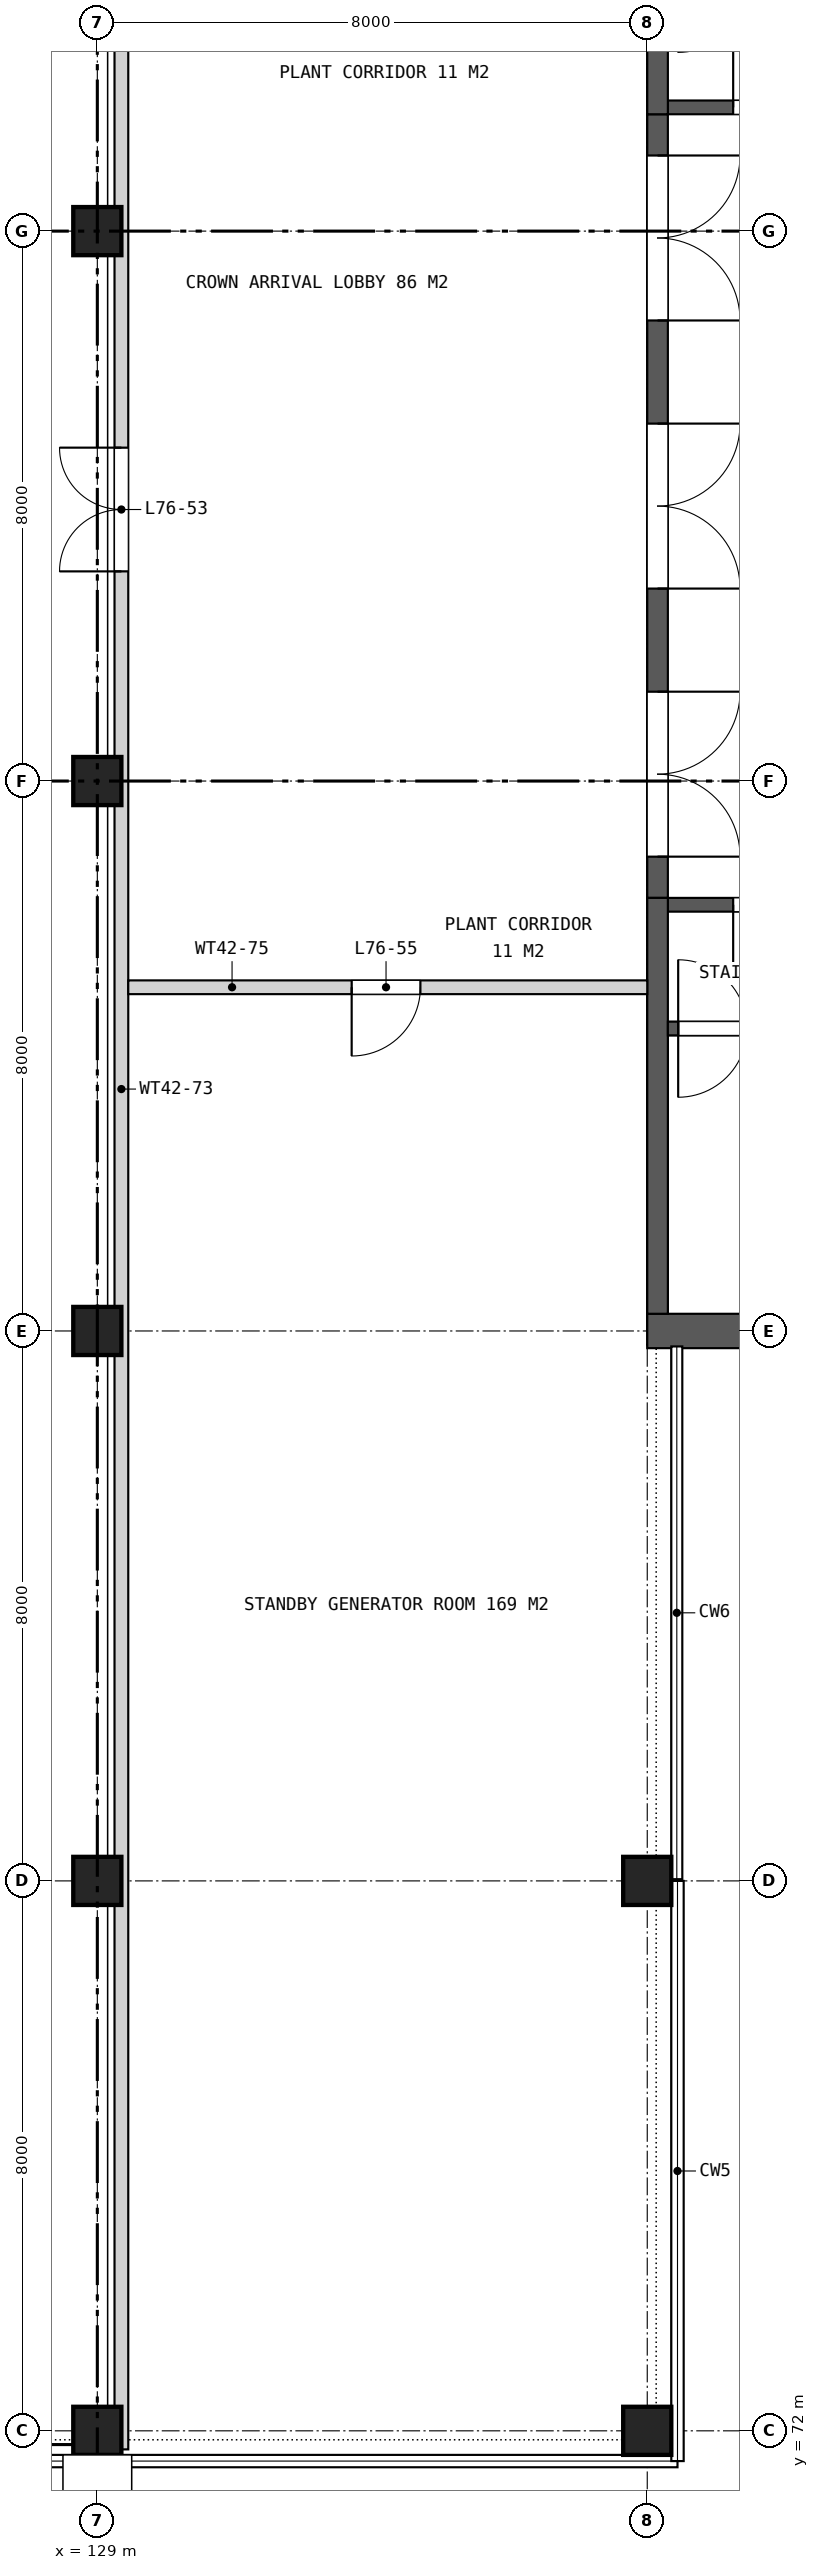
"""IFC4 building model, lengths in metres.
Left out: names, types, materials, properties, quantities, classifications, styles, units other than length and angle.
Written with IfcOpenShell. Run it as: python <this file> out.ifc"""

import sys

from ifc_helpers import new_model, si_unit, direction, frame, frame_2d, origin, origin_2d, place, context, subcontext, project, spatial, rectangle, extrude, element, fill, save


model = new_model("IFC4")
c1 = context("Model", 3, precision=1e-05, world=origin(), true_north=direction((0.0, 1.0)))
c2 = subcontext(c1, "Body", "Model", "MODEL_VIEW")
j1 = project(units=[si_unit("LENGTHUNIT", "METRE"), si_unit("PLANEANGLEUNIT", "RADIAN")], contexts=[c1])
p1 = place(None, origin())
s1 = spatial("IfcSite", under=j1, at=p1, CompositionType="ELEMENT")
p2 = place(p1, origin())
s2 = spatial("IfcBuilding", under=s1, at=p2, CompositionType="ELEMENT")
p3 = place(p2, frame((0.0, 0.0, 349.1)))
s3 = spatial("IfcBuildingStorey", under=s2, at=p3, CompositionType="ELEMENT", Elevation=349.1)
for number, where, z_axis, x_axis in (
    (1, (129.0, 72.0, 0.0), (0.0, 0.0, 1.0), (1.0, 0.0, 0.0)),
    (2, (129.0, 80.0, 0.0), (0.0, 0.0, 1.0), (1.0, 0.0, 0.0)),
    (3, (129.0, 88.0, 0.0), (0.0, 0.0, 1.0), (1.0, 0.0, 0.0)),
    (4, (129.0, 96.0, 0.0), (0.0, 0.0, 1.0), (1.0, 0.0, 0.0)),
    (5, (129.0, 104.0, 0.0), (0.0, 0.0, 1.0), (1.0, 0.0, 0.0)),
    (6, (137.0, 72.0, 0.0), (0.0, 0.0, 1.0), (1.0, 0.0, 0.0)),
    (7, (137.0, 80.0, 0.0), (0.0, 0.0, 1.0), (1.0, 0.0, 0.0)),
):
    element("IfcColumn", number, at=place(p3, frame(where, z_axis=z_axis, x_axis=x_axis)), inside=s3, PredefinedType="COLUMN", context=c2, shape_type="SweptSolid", body=[
        extrude(rectangle(XDim=0.7, YDim=0.7, at=origin_2d()), origin(), (0.0, 0.0, 1.0), 10.23),
    ])
p4 = place(p3, frame((137.0, 88.0, 0.0), z_axis=(0.0, 0.0, 1.0), x_axis=(1.0, 0.0, 0.0)))
e8 = element("IfcWall", 8, at=p4, inside=s3, PredefinedType="SHEAR", context=c2, shape_type="SweptSolid", body=[
    extrude(rectangle(XDim=7.1, YDim=0.5, at=frame_2d((3.55, 0.0))), origin(), (0.0, 0.0, 1.0), 12.0),
])
p5 = place(p3, frame((137.15, 94.3, 0.0), z_axis=(0.0, 0.0, 1.0), x_axis=(0.0, 1.0, 0.0)))
e9 = element("IfcWall", 9, at=p5, inside=s3, PredefinedType="SHEAR", context=c2, shape_type="SweptSolid", body=[
    extrude(rectangle(XDim=11.4, YDim=0.3, at=frame_2d((5.7, 0.0))), origin(), (0.0, 0.0, 1.0), 12.0),
])
p6 = place(p5, frame((0.6, 0.0, 0.0)))
e10 = element("IfcOpeningElement", 10, at=p6, cuts=e9, PredefinedType="OPENING", context=c2, shape_type="SweptSolid", body=[
    extrude(rectangle(XDim=2.4, YDim=2.4, at=frame_2d((1.2, 1.2))), frame((0.0, 0.16, 0.0), z_axis=(0.0, -1.0, 0.0), x_axis=(1.0, 0.0, 0.0)), (0.0, 0.0, 1.0), 0.32),
])
p7 = place(p5, frame((4.5, 0.0, 0.0)))
e11 = element("IfcOpeningElement", 11, at=p7, cuts=e9, PredefinedType="OPENING", context=c2, shape_type="SweptSolid", body=[
    extrude(rectangle(XDim=2.4, YDim=2.4, at=frame_2d((1.2, 1.2))), frame((0.0, 0.16, 0.0), z_axis=(0.0, -1.0, 0.0), x_axis=(1.0, 0.0, 0.0)), (0.0, 0.0, 1.0), 0.32),
])
p8 = place(p5, frame((8.4, 0.0, 0.0)))
e12 = element("IfcOpeningElement", 12, at=p8, cuts=e9, PredefinedType="OPENING", context=c2, shape_type="SweptSolid", body=[
    extrude(rectangle(XDim=2.4, YDim=2.4, at=frame_2d((1.2, 1.2))), frame((0.0, 0.16, 0.0), z_axis=(0.0, -1.0, 0.0), x_axis=(1.0, 0.0, 0.0)), (0.0, 0.0, 1.0), 0.32),
])
p9 = place(p3, frame((137.3, 105.8, 0.0), z_axis=(0.0, 0.0, 1.0), x_axis=(1.0, 0.0, 0.0)))
e13 = element("IfcWall", 13, at=p9, inside=s3, PredefinedType="SHEAR", context=c2, shape_type="SweptSolid", body=[
    extrude(rectangle(XDim=15.5, YDim=0.2, at=frame_2d((7.75, 0.0))), origin(), (0.0, 0.0, 1.0), 9.2),
])
p10 = place(p9, frame((0.95, 0.0, 0.0)))
e14 = element("IfcOpeningElement", 14, at=p10, cuts=e13, PredefinedType="OPENING", context=c2, shape_type="SweptSolid", body=[
    extrude(rectangle(XDim=1.1, YDim=2.1, at=frame_2d((0.55, 1.05))), frame((0.0, 0.11, 0.0), z_axis=(0.0, -1.0, 0.0), x_axis=(1.0, 0.0, 0.0)), (0.0, 0.0, 1.0), 0.22),
])
p11 = place(p3, frame((137.15, 105.7, 0.0), z_axis=(0.0, 0.0, 1.0), x_axis=(0.0, 1.0, 0.0)))
e15 = element("IfcWall", 15, at=p11, inside=s3, PredefinedType="SHEAR", context=c2, shape_type="SweptSolid", body=[
    extrude(rectangle(XDim=6.05, YDim=0.3, at=frame_2d((3.025, 0.0))), origin(), (0.0, 0.0, 1.0), 12.0),
])
p12 = place(p3, frame((137.3, 94.2, 0.0), z_axis=(0.0, 0.0, 1.0), x_axis=(1.0, 0.0, 0.0)))
e16 = element("IfcWall", 16, at=p12, inside=s3, PredefinedType="SHEAR", context=c2, shape_type="SweptSolid", body=[
    extrude(rectangle(XDim=15.5, YDim=0.2, at=frame_2d((7.75, 0.0))), origin(), (0.0, 0.0, 1.0), 9.2),
])
p13 = place(p12, frame((0.95, 0.0, 0.0)))
e17 = element("IfcOpeningElement", 17, at=p13, cuts=e16, PredefinedType="OPENING", context=c2, shape_type="SweptSolid", body=[
    extrude(rectangle(XDim=1.1, YDim=2.1, at=frame_2d((0.55, 1.05))), frame((0.0, 0.11, 0.0), z_axis=(0.0, -1.0, 0.0), x_axis=(1.0, 0.0, 0.0)), (0.0, 0.0, 1.0), 0.22),
])
p14 = place(p3, frame((137.15, 88.25, 0.0), z_axis=(0.0, 0.0, 1.0), x_axis=(0.0, 1.0, 0.0)))
e18 = element("IfcWall", 18, at=p14, inside=s3, PredefinedType="SHEAR", context=c2, shape_type="SweptSolid", body=[
    extrude(rectangle(XDim=6.05, YDim=0.3, at=frame_2d((3.025, 0.0))), origin(), (0.0, 0.0, 1.0), 12.0),
])
p15 = place(p3, frame((137.3, 92.4, 0.0), z_axis=(0.0, 0.0, 1.0), x_axis=(1.0, 0.0, 0.0)))
e19 = element("IfcWall", 19, at=p15, inside=s3, PredefinedType="SHEAR", context=c2, shape_type="SweptSolid", body=[
    extrude(rectangle(XDim=6.8, YDim=0.2, at=frame_2d((3.4, 0.0))), origin(), (0.0, 0.0, 1.0), 11.6),
])
p16 = place(p15, frame((0.15, 0.0, 0.0)))
e20 = element("IfcOpeningElement", 20, at=p16, cuts=e19, PredefinedType="OPENING", context=c2, shape_type="SweptSolid", body=[
    extrude(rectangle(XDim=1.0, YDim=2.1, at=frame_2d((0.5, 1.05))), frame((0.0, 0.11, 0.0), z_axis=(0.0, -1.0, 0.0), x_axis=(1.0, 0.0, 0.0)), (0.0, 0.0, 1.0), 0.22),
])
p17 = place(p15, frame((0.15, 0.0, 9.2)))
e21 = element("IfcOpeningElement", 21, at=p17, cuts=e19, PredefinedType="OPENING", context=c2, shape_type="SweptSolid", body=[
    extrude(rectangle(XDim=1.0, YDim=2.1, at=frame_2d((0.5, 1.05))), frame((0.0, 0.11, 0.0), z_axis=(0.0, -1.0, 0.0), x_axis=(1.0, 0.0, 0.0)), (0.0, 0.0, 1.0), 0.22),
])
p18 = place(p3, frame((129.35, 71.73, 0.0), z_axis=(0.0, 0.0, 1.0), x_axis=(0.0, 1.0, 0.0)))
e22 = element("IfcWall", 22, at=p18, inside=s3, PredefinedType="SOLIDWALL", context=c2, shape_type="SweptSolid", body=[
    extrude(rectangle(XDim=56.54, YDim=0.2, at=frame_2d((28.27, 0.0))), origin(), (0.0, 0.0, 1.0), 11.6),
])
p19 = place(p18, frame((27.32, 0.0, 0.0)))
e23 = element("IfcOpeningElement", 23, at=p19, cuts=e22, PredefinedType="OPENING", context=c2, shape_type="SweptSolid", body=[
    extrude(rectangle(XDim=1.8, YDim=2.1, at=frame_2d((0.9, 1.05))), frame((0.0, 0.11, 0.0), z_axis=(0.0, -1.0, 0.0), x_axis=(1.0, 0.0, 0.0)), (0.0, 0.0, 1.0), 0.22),
])
p20 = place(p3, frame((129.45, 93.0, 0.0), z_axis=(0.0, 0.0, 1.0), x_axis=(1.0, 0.0, 0.0)))
e24 = element("IfcWall", 24, at=p20, inside=s3, PredefinedType="SOLIDWALL", context=c2, shape_type="SweptSolid", body=[
    extrude(rectangle(XDim=7.55, YDim=0.2, at=frame_2d((3.775, 0.0))), origin(), (0.0, 0.0, 1.0), 11.6),
])
p21 = place(p20, frame((3.25, 0.0, 0.0)))
e25 = element("IfcOpeningElement", 25, at=p21, cuts=e24, PredefinedType="OPENING", context=c2, shape_type="SweptSolid", body=[
    extrude(rectangle(XDim=1.0, YDim=2.1, at=frame_2d((0.5, 1.05))), frame((0.0, 0.11, 0.0), z_axis=(0.0, -1.0, 0.0), x_axis=(1.0, 0.0, 0.0)), (0.0, 0.0, 1.0), 0.22),
])
p22 = place(p6, frame((2.4, 0.0, 0.0), z_axis=(0.0, 0.0, 1.0), x_axis=(-1.0, 0.0, 0.0)))
e26 = element("IfcDoor", 26, at=p22, inside=s3, OperationType="DOUBLE_DOOR_SINGLE_SWING", PredefinedType="DOOR", context=c2, shape_type="SweptSolid", body=[
    extrude(rectangle(XDim=2.4, YDim=2.4, at=frame_2d((1.2, 1.2))), frame((0.0, 0.025, 0.0), z_axis=(0.0, -1.0, 0.0), x_axis=(1.0, 0.0, 0.0)), (0.0, 0.0, 1.0), 0.05),
])
fill(e10, e26)
p23 = place(p7, frame((2.4, 0.0, 0.0), z_axis=(0.0, 0.0, 1.0), x_axis=(-1.0, 0.0, 0.0)))
e27 = element("IfcDoor", 27, at=p23, inside=s3, OperationType="DOUBLE_DOOR_SINGLE_SWING", PredefinedType="DOOR", context=c2, shape_type="SweptSolid", body=[
    extrude(rectangle(XDim=2.4, YDim=2.4, at=frame_2d((1.2, 1.2))), frame((0.0, 0.025, 0.0), z_axis=(0.0, -1.0, 0.0), x_axis=(1.0, 0.0, 0.0)), (0.0, 0.0, 1.0), 0.05),
])
fill(e11, e27)
p24 = place(p8, frame((2.4, 0.0, 0.0), z_axis=(0.0, 0.0, 1.0), x_axis=(-1.0, 0.0, 0.0)))
e28 = element("IfcDoor", 28, at=p24, inside=s3, OperationType="DOUBLE_DOOR_SINGLE_SWING", PredefinedType="DOOR", context=c2, shape_type="SweptSolid", body=[
    extrude(rectangle(XDim=2.4, YDim=2.4, at=frame_2d((1.2, 1.2))), frame((0.0, 0.025, 0.0), z_axis=(0.0, -1.0, 0.0), x_axis=(1.0, 0.0, 0.0)), (0.0, 0.0, 1.0), 0.05),
])
fill(e12, e28)
p25 = place(p10, origin())
e29 = element("IfcDoor", 29, at=p25, inside=s3, OperationType="SINGLE_SWING_LEFT", PredefinedType="DOOR", context=c2, shape_type="SweptSolid", body=[
    extrude(rectangle(XDim=1.1, YDim=2.1, at=frame_2d((0.55, 1.05))), frame((0.0, 0.025, 0.0), z_axis=(0.0, -1.0, 0.0), x_axis=(1.0, 0.0, 0.0)), (0.0, 0.0, 1.0), 0.05),
])
fill(e14, e29)
p26 = place(p13, frame((1.1, 0.0, 0.0), z_axis=(0.0, 0.0, 1.0), x_axis=(-1.0, 0.0, 0.0)))
e30 = element("IfcDoor", 30, at=p26, inside=s3, OperationType="SINGLE_SWING_RIGHT", PredefinedType="DOOR", context=c2, shape_type="SweptSolid", body=[
    extrude(rectangle(XDim=1.1, YDim=2.1, at=frame_2d((0.55, 1.05))), frame((0.0, 0.025, 0.0), z_axis=(0.0, -1.0, 0.0), x_axis=(1.0, 0.0, 0.0)), (0.0, 0.0, 1.0), 0.05),
])
fill(e17, e30)
p27 = place(p16, frame((1.0, 0.0, 0.0), z_axis=(0.0, 0.0, 1.0), x_axis=(-1.0, 0.0, 0.0)))
e31 = element("IfcDoor", 31, at=p27, inside=s3, OperationType="SINGLE_SWING_RIGHT", PredefinedType="DOOR", context=c2, shape_type="SweptSolid", body=[
    extrude(rectangle(XDim=1.0, YDim=2.1, at=frame_2d((0.5, 1.05))), frame((0.0, 0.025, 0.0), z_axis=(0.0, -1.0, 0.0), x_axis=(1.0, 0.0, 0.0)), (0.0, 0.0, 1.0), 0.05),
])
fill(e20, e31)
p28 = place(p17, origin())
e32 = element("IfcDoor", 32, at=p28, inside=s3, OperationType="SINGLE_SWING_LEFT", PredefinedType="DOOR", context=c2, shape_type="SweptSolid", body=[
    extrude(rectangle(XDim=1.0, YDim=2.1, at=frame_2d((0.5, 1.05))), frame((0.0, 0.025, 0.0), z_axis=(0.0, -1.0, 0.0), x_axis=(1.0, 0.0, 0.0)), (0.0, 0.0, 1.0), 0.05),
])
fill(e21, e32)
p29 = place(p19, origin())
e33 = element("IfcDoor", 33, at=p29, inside=s3, OperationType="DOUBLE_DOOR_SINGLE_SWING", PredefinedType="DOOR", context=c2, shape_type="SweptSolid", body=[
    extrude(rectangle(XDim=1.8, YDim=2.1, at=frame_2d((0.9, 1.05))), frame((0.0, 0.025, 0.0), z_axis=(0.0, -1.0, 0.0), x_axis=(1.0, 0.0, 0.0)), (0.0, 0.0, 1.0), 0.05),
])
fill(e23, e33)
p30 = place(p21, frame((1.0, 0.0, 0.0), z_axis=(0.0, 0.0, 1.0), x_axis=(-1.0, 0.0, 0.0)))
e34 = element("IfcDoor", 34, at=p30, inside=s3, OperationType="SINGLE_SWING_RIGHT", PredefinedType="DOOR", context=c2, shape_type="SweptSolid", body=[
    extrude(rectangle(XDim=1.0, YDim=2.1, at=frame_2d((0.5, 1.05))), frame((0.0, 0.025, 0.0), z_axis=(0.0, -1.0, 0.0), x_axis=(1.0, 0.0, 0.0)), (0.0, 0.0, 1.0), 0.05),
])
fill(e25, e34)
save(model, sys.argv[1])
